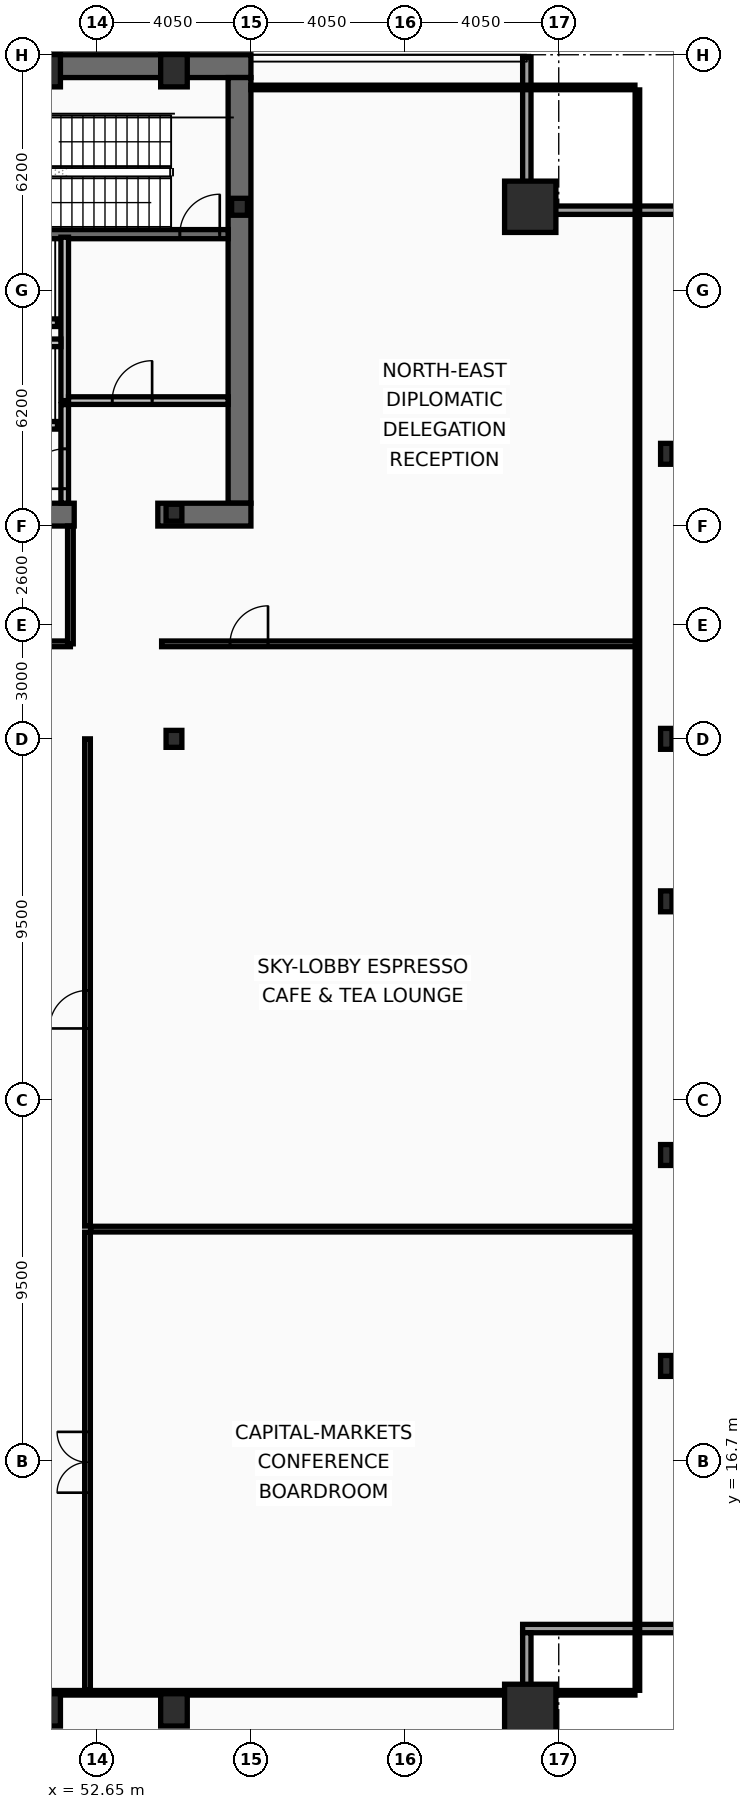
"""IFC4 building model, lengths in metres.
Left out: names, types, materials, properties, quantities, classifications, styles, units other than length and angle.
Written with IfcOpenShell. Run it as: python <this file> out.ifc"""

import sys

from ifc_helpers import new_model, si_unit, direction, frame, frame_2d, origin, origin_2d, place, context, subcontext, project, spatial, rectangle, hollow_rectangle, i_section, extrude, element, fill, save


model = new_model("IFC4")
c1 = context("Model", 3, precision=1e-05, world=origin(), true_north=direction((0.0, 1.0)))
c2 = subcontext(c1, "Body", "Model", "MODEL_VIEW")
j1 = project(units=[si_unit("LENGTHUNIT", "METRE"), si_unit("PLANEANGLEUNIT", "RADIAN")], contexts=[c1])
p1 = place(None, origin())
s1 = spatial("IfcSite", under=j1, at=p1, CompositionType="ELEMENT")
p2 = place(p1, origin())
s2 = spatial("IfcBuilding", under=s1, at=p2, CompositionType="ELEMENT")
p3 = place(p2, frame((0.0, 0.0, 184.2)))
s3 = spatial("IfcBuildingStorey", under=s2, at=p3, CompositionType="ELEMENT", Elevation=184.2)
p4 = place(p3, frame((16.2, 53.4, 0.0), z_axis=(0.0, 0.0, 1.0), x_axis=(1.0, 0.0, 0.0)))
e1 = element("IfcWall", 1, at=p4, inside=s3, PredefinedType="SHEAR", context=c2, shape_type="SweptSolid", body=[
    extrude(rectangle(XDim=40.5, YDim=0.6, at=frame_2d((20.25, 0.0))), origin(), (0.0, 0.0, 1.0), 4.24),
])
p5 = place(p3, frame((56.4, 53.1, 0.0), z_axis=(0.0, 0.0, 1.0), x_axis=(0.0, -1.0, 0.0)))
e2 = element("IfcWall", 2, at=p5, inside=s3, PredefinedType="SHEAR", context=c2, shape_type="SweptSolid", body=[
    extrude(rectangle(XDim=11.2, YDim=0.6, at=frame_2d((5.6, 0.0))), origin(), (0.0, 0.0, 1.0), 4.24),
])
p6 = place(p3, frame((52.05, 41.6, 0.0), z_axis=(0.0, 0.0, 1.0), x_axis=(-1.0, 0.0, 0.0)))
e3 = element("IfcWall", 3, at=p6, inside=s3, PredefinedType="SHEAR", context=c2, shape_type="SweptSolid", body=[
    extrude(rectangle(XDim=11.3, YDim=0.6, at=frame_2d((5.65, 0.0))), origin(), (0.0, 0.0, 1.0), 4.24),
])
p7 = place(p3, frame((56.7, 41.6, 0.0), z_axis=(0.0, 0.0, 1.0), x_axis=(-1.0, 0.0, 0.0)))
e4 = element("IfcWall", 4, at=p7, inside=s3, PredefinedType="SHEAR", context=c2, shape_type="SweptSolid", body=[
    extrude(rectangle(XDim=2.45, YDim=0.6, at=frame_2d((1.225, 0.0))), origin(), (0.0, 0.0, 1.0), 4.24),
])
p8 = place(p3, frame((48.63, 48.98, 0.0), z_axis=(0.0, 0.0, 1.0), x_axis=(1.0, 0.0, 0.0)))
e5 = element("IfcWall", 5, at=p8, inside=s3, PredefinedType="SHEAR", context=c2, shape_type="SweptSolid", body=[
    extrude(rectangle(XDim=7.47, YDim=0.24, at=frame_2d((3.735, 0.0))), origin(), (0.0, 0.0, 1.0), 4.24),
])
p9 = place(p8, frame((6.2, 0.0, 0.0)))
e6 = element("IfcOpeningElement", 6, at=p9, cuts=e5, PredefinedType="OPENING", context=c2, shape_type="SweptSolid", body=[
    extrude(rectangle(XDim=1.05, YDim=2.15, at=frame_2d((0.525, 1.075))), frame((0.0, 0.13, 0.0), z_axis=(0.0, -1.0, 0.0), x_axis=(1.0, 0.0, 0.0)), (0.0, 0.0, 1.0), 0.26),
])
for number, where, z_axis, x_axis in (
    (7, (64.05, 10.15, 0.0), (0.0, 0.0, 1.0), (1.0, 0.0, 0.0)),
    (8, (64.05, 49.7, 0.0), (0.0, 0.0, 1.0), (1.0, 0.0, 0.0)),
):
    element("IfcColumn", number, at=place(p3, frame(where, z_axis=z_axis, x_axis=x_axis)), inside=s3, PredefinedType="COLUMN", context=c2, shape_type="SweptSolid", body=[
        extrude(hollow_rectangle(XDim=1.35, YDim=1.35, WallThickness=0.065, at=origin_2d()), origin(), (0.0, 0.0, 1.0), 4.4),
    ])
for number, where, z_axis, x_axis in (
    (9, (51.337, 10.15, 0.0), (0.0, 0.0, 1.0), (1.0, 0.0, 0.0)),
    (10, (54.675, 10.15, 0.0), (0.0, 0.0, 1.0), (1.0, 0.0, 0.0)),
    (11, (51.337, 53.28, 0.0), (0.0, 0.0, 1.0), (1.0, 0.0, 0.0)),
    (12, (54.675, 53.28, 0.0), (0.0, 0.0, 1.0), (1.0, 0.0, 0.0)),
):
    element("IfcColumn", number, at=place(p3, frame(where, z_axis=z_axis, x_axis=x_axis)), inside=s3, PredefinedType="COLUMN", context=c2, shape_type="SweptSolid", body=[
        extrude(hollow_rectangle(XDim=0.7, YDim=0.85, WallThickness=0.05, at=origin_2d()), origin(), (0.0, 0.0, 1.0), 4.4),
    ])
for number, where, z_axis, x_axis in (
    (13, (67.63, 19.2, 0.0), (0.0, 0.0, 1.0), (1.0, 0.0, 0.0)),
    (14, (67.63, 24.75, 0.0), (0.0, 0.0, 1.0), (1.0, 0.0, 0.0)),
    (15, (67.63, 31.425, 0.0), (0.0, 0.0, 1.0), (1.0, 0.0, 0.0)),
    (16, (67.63, 35.7, 0.0), (0.0, 0.0, 1.0), (1.0, 0.0, 0.0)),
    (17, (67.63, 43.2, 0.0), (0.0, 0.0, 1.0), (1.0, 0.0, 0.0)),
):
    element("IfcColumn", number, at=place(p3, frame(where, z_axis=z_axis, x_axis=x_axis)), inside=s3, PredefinedType="COLUMN", context=c2, shape_type="SweptSolid", body=[
        extrude(i_section(OverallWidth=0.3, OverallDepth=0.55, WebThickness=0.015, FlangeThickness=0.029, at=origin_2d()), origin(), (0.0, 0.0, 1.0), 4.4),
    ])
for number, where, z_axis, x_axis in (
    (18, (56.4, 49.7, 0.0), (0.0, 0.0, 1.0), (1.0, 0.0, 0.0)),
    (19, (54.675, 35.7, 0.0), (0.0, 0.0, 1.0), (1.0, 0.0, 0.0)),
    (20, (54.675, 41.65, 0.0), (0.0, 0.0, 1.0), (1.0, 0.0, 0.0)),
):
    element("IfcColumn", number, at=place(p3, frame(where, z_axis=z_axis, x_axis=x_axis)), inside=s3, PredefinedType="COLUMN", context=c2, shape_type="SweptSolid", body=[
        extrude(i_section(OverallWidth=0.416, OverallDepth=0.446, WebThickness=0.039, FlangeThickness=0.063, at=origin_2d()), origin(), (0.0, 0.0, 1.0), 4.4),
    ])
p10 = place(p3, frame((63.96, 53.63, 0.0), z_axis=(0.0, 0.0, 1.0), x_axis=(0.0, -1.0, 0.0)))
e21 = element("IfcWall", 21, at=p10, inside=s3, PredefinedType="SOLIDWALL", context=c2, shape_type="SweptSolid", body=[
    extrude(rectangle(XDim=3.91, YDim=0.22, at=frame_2d((1.955, 0.0))), origin(), (0.0, 0.0, 1.0), 2.89),
])
p11 = place(p3, frame((63.85, 49.61, 0.0), z_axis=(0.0, 0.0, 1.0), x_axis=(1.0, 0.0, 0.0)))
e22 = element("IfcWall", 22, at=p11, inside=s3, PredefinedType="SOLIDWALL", context=c2, shape_type="SweptSolid", body=[
    extrude(rectangle(XDim=4.13, YDim=0.22, at=frame_2d((2.065, 0.0))), origin(), (0.0, 0.0, 1.0), 2.89),
])
p12 = place(p3, frame((67.98, 12.29, 0.0), z_axis=(0.0, 0.0, 1.0), x_axis=(-1.0, 0.0, 0.0)))
e23 = element("IfcWall", 23, at=p12, inside=s3, PredefinedType="SOLIDWALL", context=c2, shape_type="SweptSolid", body=[
    extrude(rectangle(XDim=4.13, YDim=0.22, at=frame_2d((2.065, 0.0))), origin(), (0.0, 0.0, 1.0), 3.63),
])
p13 = place(p3, frame((63.96, 12.18, 0.0), z_axis=(0.0, 0.0, 1.0), x_axis=(0.0, -1.0, 0.0)))
e24 = element("IfcWall", 24, at=p13, inside=s3, PredefinedType="SOLIDWALL", context=c2, shape_type="SweptSolid", body=[
    extrude(rectangle(XDim=3.91, YDim=0.22, at=frame_2d((1.955, 0.0))), origin(), (0.0, 0.0, 1.0), 2.89),
])
p14 = place(p3, frame((51.61, 43.95, 0.0), z_axis=(0.0, 0.0, 1.0), x_axis=(-1.0, 0.0, 0.0)))
e25 = element("IfcWall", 25, at=p14, inside=s3, PredefinedType="PARTITIONING", context=c2, shape_type="SweptSolid", body=[
    extrude(rectangle(XDim=2.92, YDim=0.2, at=frame_2d((1.46, 0.0))), origin(), (0.0, 0.0, 1.0), 4.24),
])
p15 = place(p14, frame((0.81, 0.0, 0.0)))
e26 = element("IfcOpeningElement", 26, at=p15, cuts=e25, PredefinedType="OPENING", context=c2, shape_type="SweptSolid", body=[
    extrude(rectangle(XDim=1.3, YDim=2.18, at=frame_2d((0.65, 1.09))), frame((0.0, 0.11, 0.0), z_axis=(0.0, -1.0, 0.0), x_axis=(1.0, 0.0, 0.0)), (0.0, 0.0, 1.0), 0.22),
])
p16 = place(p3, frame((51.61, 46.65, 0.0), z_axis=(0.0, 0.0, 1.0), x_axis=(-1.0, 0.0, 0.0)))
e27 = element("IfcWall", 27, at=p16, inside=s3, PredefinedType="PARTITIONING", context=c2, shape_type="SweptSolid", body=[
    extrude(rectangle(XDim=2.92, YDim=0.2, at=frame_2d((1.46, 0.0))), origin(), (0.0, 0.0, 1.0), 4.24),
])
p17 = place(p16, frame((0.86, 0.0, 0.0)))
e28 = element("IfcOpeningElement", 28, at=p17, cuts=e27, PredefinedType="OPENING", context=c2, shape_type="SweptSolid", body=[
    extrude(rectangle(XDim=1.2, YDim=2.18, at=frame_2d((0.6, 1.09))), frame((0.0, 0.11, 0.0), z_axis=(0.0, -1.0, 0.0), x_axis=(1.0, 0.0, 0.0)), (0.0, 0.0, 1.0), 0.22),
])
p18 = place(p3, frame((51.8, 44.6, 0.0), z_axis=(0.0, 0.0, 1.0), x_axis=(0.0, 1.0, 0.0)))
e29 = element("IfcWall", 29, at=p18, inside=s3, PredefinedType="PARTITIONING", context=c2, shape_type="SweptSolid", body=[
    extrude(rectangle(XDim=4.3, YDim=0.2, at=frame_2d((2.15, 0.0))), origin(), (0.0, 0.0, 1.0), 4.24),
])
p19 = place(p3, frame((51.9, 44.6, 0.0), z_axis=(0.0, 0.0, 1.0), x_axis=(1.0, 0.0, 0.0)))
e30 = element("IfcWall", 30, at=p19, inside=s3, PredefinedType="PARTITIONING", context=c2, shape_type="SweptSolid", body=[
    extrude(rectangle(XDim=4.2, YDim=0.2, at=frame_2d((2.1, 0.0))), origin(), (0.0, 0.0, 1.0), 4.24),
])
p20 = place(p19, frame((1.15, 0.0, 0.0)))
e31 = element("IfcOpeningElement", 31, at=p20, cuts=e30, PredefinedType="OPENING", context=c2, shape_type="SweptSolid", body=[
    extrude(rectangle(XDim=1.05, YDim=2.15, at=frame_2d((0.525, 1.075))), frame((0.0, 0.11, 0.0), z_axis=(0.0, -1.0, 0.0), x_axis=(1.0, 0.0, 0.0)), (0.0, 0.0, 1.0), 0.22),
])
p21 = place(p3, frame((48.63, 46.12, 0.0), z_axis=(0.0, 0.0, 1.0), x_axis=(1.0, 0.0, 0.0)))
e32 = element("IfcWall", 32, at=p21, inside=s3, PredefinedType="PARTITIONING", context=c2, shape_type="SweptSolid", body=[
    extrude(rectangle(XDim=3.07, YDim=0.2, at=frame_2d((1.535, 0.0))), origin(), (0.0, 0.0, 1.0), 4.24),
])
p22 = place(p3, frame((51.8, 41.9, 0.0), z_axis=(0.0, 0.0, 1.0), x_axis=(0.0, 1.0, 0.0)))
e33 = element("IfcWall", 33, at=p22, inside=s3, PredefinedType="PARTITIONING", context=c2, shape_type="SweptSolid", body=[
    extrude(rectangle(XDim=2.595, YDim=0.2, at=frame_2d((1.298, 0.0))), origin(), (0.0, 0.0, 1.0), 4.24),
])
p23 = place(p22, frame((0.38, 0.0, 0.0)))
e34 = element("IfcOpeningElement", 34, at=p23, cuts=e33, PredefinedType="OPENING", context=c2, shape_type="SweptSolid", body=[
    extrude(rectangle(XDim=1.05, YDim=2.15, at=frame_2d((0.525, 1.075))), frame((0.0, 0.11, 0.0), z_axis=(0.0, -1.0, 0.0), x_axis=(1.0, 0.0, 0.0)), (0.0, 0.0, 1.0), 0.22),
])
p24 = place(p3, frame((52.4, 10.665, 0.0), z_axis=(0.0, 0.0, 1.0), x_axis=(0.0, 1.0, 0.0)))
e35 = element("IfcWall", 35, at=p24, inside=s3, PredefinedType="PARTITIONING", context=c2, shape_type="SweptSolid", body=[
    extrude(rectangle(XDim=12.055, YDim=0.15, at=frame_2d((6.027, 0.0))), origin(), (0.0, 0.0, 1.0), 3.73),
])
p25 = place(p24, frame((5.2, 0.0, 0.0)))
e36 = element("IfcOpeningElement", 36, at=p25, cuts=e35, PredefinedType="OPENING", context=c2, shape_type="SweptSolid", body=[
    extrude(rectangle(XDim=1.6, YDim=2.15, at=frame_2d((0.8, 1.075))), frame((0.0, 0.085, 0.0), z_axis=(0.0, -1.0, 0.0), x_axis=(1.0, 0.0, 0.0)), (0.0, 0.0, 1.0), 0.17),
])
p26 = place(p3, frame((52.4, 22.88, 0.0), z_axis=(0.0, 0.0, 1.0), x_axis=(0.0, 1.0, 0.0)))
e37 = element("IfcWall", 37, at=p26, inside=s3, PredefinedType="PARTITIONING", context=c2, shape_type="SweptSolid", body=[
    extrude(rectangle(XDim=12.82, YDim=0.15, at=frame_2d((6.41, 0.0))), origin(), (0.0, 0.0, 1.0), 3.73),
])
p27 = place(p26, frame((5.2, 0.0, 0.0)))
e38 = element("IfcOpeningElement", 38, at=p27, cuts=e37, PredefinedType="OPENING", context=c2, shape_type="SweptSolid", body=[
    extrude(rectangle(XDim=1.0, YDim=2.05, at=frame_2d((0.5, 1.025))), frame((0.0, 0.085, 0.0), z_axis=(0.0, -1.0, 0.0), x_axis=(1.0, 0.0, 0.0)), (0.0, 0.0, 1.0), 0.17),
])
p28 = place(p3, frame((52.48, 22.8, 0.0), z_axis=(0.0, 0.0, 1.0), x_axis=(1.0, 0.0, 0.0)))
e39 = element("IfcWall", 39, at=p28, inside=s3, PredefinedType="PARTITIONING", context=c2, shape_type="SweptSolid", body=[
    extrude(rectangle(XDim=14.325, YDim=0.15, at=frame_2d((7.163, 0.0))), origin(), (0.0, 0.0, 1.0), 3.33),
])
p29 = place(p3, frame((46.6, 38.2, 0.0), z_axis=(0.0, 0.0, 1.0), x_axis=(1.0, 0.0, 0.0)))
e40 = element("IfcWall", 40, at=p29, inside=s3, PredefinedType="PARTITIONING", context=c2, shape_type="SweptSolid", body=[
    extrude(rectangle(XDim=5.35, YDim=0.15, at=frame_2d((2.675, 0.0))), origin(), (0.0, 0.0, 1.0), 3.53),
])
p30 = place(p29, frame((2.0, 0.0, 0.0)))
e41 = element("IfcOpeningElement", 41, at=p30, cuts=e40, PredefinedType="OPENING", context=c2, shape_type="SweptSolid", body=[
    extrude(rectangle(XDim=0.9, YDim=2.05, at=frame_2d((0.45, 1.025))), frame((0.0, 0.085, 0.0), z_axis=(0.0, -1.0, 0.0), x_axis=(1.0, 0.0, 0.0)), (0.0, 0.0, 1.0), 0.17),
])
p31 = place(p3, frame((51.95, 38.2, 0.0), z_axis=(0.0, 0.0, 1.0), x_axis=(0.0, 1.0, 0.0)))
e42 = element("IfcWall", 42, at=p31, inside=s3, PredefinedType="PARTITIONING", context=c2, shape_type="SweptSolid", body=[
    extrude(rectangle(XDim=3.1, YDim=0.15, at=frame_2d((1.55, 0.0))), origin(), (0.0, 0.0, 1.0), 4.24),
])
p32 = place(p3, frame((54.35, 38.2, 0.0), z_axis=(0.0, 0.0, 1.0), x_axis=(1.0, 0.0, 0.0)))
e43 = element("IfcWall", 43, at=p32, inside=s3, PredefinedType="PARTITIONING", context=c2, shape_type="SweptSolid", body=[
    extrude(rectangle(XDim=12.52, YDim=0.15, at=frame_2d((6.26, 0.0))), origin(), (0.0, 0.0, 1.0), 3.53),
])
p33 = place(p32, frame((1.8, 0.0, 0.0)))
e44 = element("IfcOpeningElement", 44, at=p33, cuts=e43, PredefinedType="OPENING", context=c2, shape_type="SweptSolid", body=[
    extrude(rectangle(XDim=1.0, YDim=2.05, at=frame_2d((0.5, 1.025))), frame((0.0, 0.085, 0.0), z_axis=(0.0, -1.0, 0.0), x_axis=(1.0, 0.0, 0.0)), (0.0, 0.0, 1.0), 0.17),
])
p34 = place(p3, frame((66.87, 10.665, 0.0), z_axis=(0.0, 0.0, 1.0), x_axis=(0.0, 1.0, 0.0)))
e45 = element("IfcWall", 45, at=p34, inside=s3, PredefinedType="PARTITIONING", context=c2, shape_type="SweptSolid", body=[
    extrude(rectangle(XDim=42.11, YDim=0.12, at=frame_2d((21.055, 0.0))), origin(), (0.0, 0.0, 1.0), 2.63),
])
p35 = place(p3, frame((56.7, 52.84, 0.0), z_axis=(0.0, 0.0, 1.0), x_axis=(1.0, 0.0, 0.0)))
e46 = element("IfcWall", 46, at=p35, inside=s3, PredefinedType="PARTITIONING", context=c2, shape_type="SweptSolid", body=[
    extrude(rectangle(XDim=10.105, YDim=0.12, at=frame_2d((5.052, 0.0))), origin(), (0.0, 0.0, 1.0), 4.24),
])
p36 = place(p3, frame((6.095, 10.6, 0.0), z_axis=(0.0, 0.0, 1.0), x_axis=(1.0, 0.0, 0.0)))
e47 = element("IfcWall", 47, at=p36, inside=s3, PredefinedType="PARTITIONING", context=c2, shape_type="SweptSolid", body=[
    extrude(rectangle(XDim=60.71, YDim=0.12, at=frame_2d((30.355, 0.0))), origin(), (0.0, 0.0, 1.0), 2.89),
])
p37 = place(p9, origin())
e48 = element("IfcDoor", 48, at=p37, inside=s3, OperationType="SINGLE_SWING_RIGHT", PredefinedType="DOOR", context=c2, shape_type="SweptSolid", body=[
    extrude(rectangle(XDim=1.05, YDim=2.15, at=frame_2d((0.525, 1.075))), frame((0.0, 0.025, 0.0), z_axis=(0.0, -1.0, 0.0), x_axis=(1.0, 0.0, 0.0)), (0.0, 0.0, 1.0), 0.05),
])
fill(e6, e48)
p38 = place(p20, origin())
e49 = element("IfcDoor", 49, at=p38, inside=s3, OperationType="SINGLE_SWING_RIGHT", PredefinedType="DOOR", context=c2, shape_type="SweptSolid", body=[
    extrude(rectangle(XDim=1.05, YDim=2.15, at=frame_2d((0.525, 1.075))), frame((0.0, 0.025, 0.0), z_axis=(0.0, -1.0, 0.0), x_axis=(1.0, 0.0, 0.0)), (0.0, 0.0, 1.0), 0.05),
])
fill(e31, e49)
p39 = place(p23, origin())
e50 = element("IfcDoor", 50, at=p39, inside=s3, OperationType="SINGLE_SWING_LEFT", PredefinedType="DOOR", context=c2, shape_type="SweptSolid", body=[
    extrude(rectangle(XDim=1.05, YDim=2.15, at=frame_2d((0.525, 1.075))), frame((0.0, 0.025, 0.0), z_axis=(0.0, -1.0, 0.0), x_axis=(1.0, 0.0, 0.0)), (0.0, 0.0, 1.0), 0.05),
])
fill(e34, e50)
p40 = place(p25, origin())
e51 = element("IfcDoor", 51, at=p40, inside=s3, OperationType="DOUBLE_DOOR_SINGLE_SWING", PredefinedType="DOOR", context=c2, shape_type="SweptSolid", body=[
    extrude(rectangle(XDim=1.6, YDim=2.15, at=frame_2d((0.8, 1.075))), frame((0.0, 0.025, 0.0), z_axis=(0.0, -1.0, 0.0), x_axis=(1.0, 0.0, 0.0)), (0.0, 0.0, 1.0), 0.05),
])
fill(e36, e51)
p41 = place(p27, origin())
e52 = element("IfcDoor", 52, at=p41, inside=s3, OperationType="SINGLE_SWING_LEFT", PredefinedType="DOOR", context=c2, shape_type="SweptSolid", body=[
    extrude(rectangle(XDim=1.0, YDim=2.05, at=frame_2d((0.5, 1.025))), frame((0.0, 0.025, 0.0), z_axis=(0.0, -1.0, 0.0), x_axis=(1.0, 0.0, 0.0)), (0.0, 0.0, 1.0), 0.05),
])
fill(e38, e52)
p42 = place(p33, origin())
e53 = element("IfcDoor", 53, at=p42, inside=s3, OperationType="SINGLE_SWING_RIGHT", PredefinedType="DOOR", context=c2, shape_type="SweptSolid", body=[
    extrude(rectangle(XDim=1.0, YDim=2.05, at=frame_2d((0.5, 1.025))), frame((0.0, 0.025, 0.0), z_axis=(0.0, -1.0, 0.0), x_axis=(1.0, 0.0, 0.0)), (0.0, 0.0, 1.0), 0.05),
])
fill(e44, e53)
save(model, sys.argv[1])
